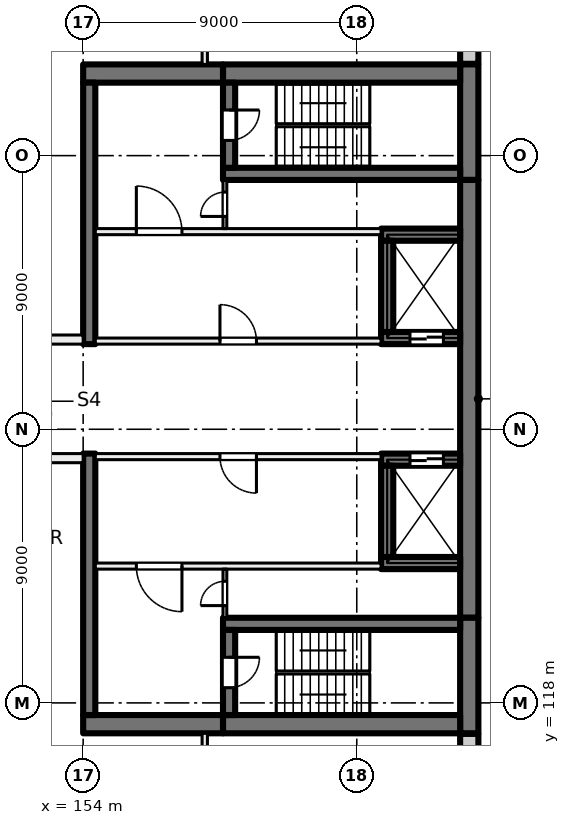
"""IFC4 building model, lengths in metres.
Left out: names, types, materials, properties, quantities, classifications, styles, units other than length and angle.
Written with IfcOpenShell. Run it as: python <this file> out.ifc"""

import sys

from ifc_helpers import new_model, si_unit, direction, frame, frame_2d, origin, place, context, subcontext, project, spatial, rectangle, extrude, element, fill, save


model = new_model("IFC4")
c1 = context("Model", 3, precision=1e-05, world=origin(), true_north=direction((0.0, 1.0)))
c2 = subcontext(c1, "Body", "Model", "MODEL_VIEW")
j1 = project(units=[si_unit("LENGTHUNIT", "METRE"), si_unit("PLANEANGLEUNIT", "RADIAN")], contexts=[c1])
p1 = place(None, origin())
s1 = spatial("IfcSite", under=j1, at=p1, CompositionType="ELEMENT")
p2 = place(p1, origin())
s2 = spatial("IfcBuilding", under=s1, at=p2, CompositionType="ELEMENT")
p3 = place(p2, frame((0.0, 0.0, 43.5)))
s3 = spatial("IfcBuildingStorey", under=s2, at=p3, CompositionType="ELEMENT", Elevation=43.5)
p4 = place(p3, frame((166.7, 139.0, 0.0), z_axis=(0.0, 0.0, 1.0), x_axis=(0.0, -1.0, 0.0)))
e1 = element("IfcWall", 1, at=p4, inside=s3, PredefinedType="SHEAR", context=c2, shape_type="SweptSolid", body=[
    extrude(rectangle(XDim=3.8, YDim=0.6, at=frame_2d((1.9, 0.0))), origin(), (0.0, 0.0, 1.0), 4.0),
])
p5 = place(p3, frame((166.7, 135.2, 0.0), z_axis=(0.0, 0.0, 1.0), x_axis=(0.0, -1.0, 0.0)))
e2 = element("IfcWall", 2, at=p5, inside=s3, PredefinedType="SHEAR", context=c2, shape_type="SweptSolid", body=[
    extrude(rectangle(XDim=14.4, YDim=0.6, at=frame_2d((7.2, 0.0))), origin(), (0.0, 0.0, 1.0), 4.0),
])
p6 = place(p3, frame((166.7, 120.8, 0.0), z_axis=(0.0, 0.0, 1.0), x_axis=(0.0, -1.0, 0.0)))
e3 = element("IfcWall", 3, at=p6, inside=s3, PredefinedType="SHEAR", context=c2, shape_type="SweptSolid", body=[
    extrude(rectangle(XDim=3.8, YDim=0.6, at=frame_2d((1.9, 0.0))), origin(), (0.0, 0.0, 1.0), 4.0),
])
for number, where, z_axis, x_axis in (
    (4, (166.4, 138.7, 0.0), (0.0, 0.0, 1.0), (-1.0, 0.0, 0.0)),
    (5, (166.4, 117.3, 0.0), (0.0, 0.0, 1.0), (-1.0, 0.0, 0.0)),
):
    element("IfcWall", number, at=place(p3, frame(where, z_axis=z_axis, x_axis=x_axis)), inside=s3, PredefinedType="SHEAR", context=c2, shape_type="SweptSolid", body=[
        extrude(rectangle(XDim=7.8, YDim=0.6, at=frame_2d((3.9, 0.0))), origin(), (0.0, 0.0, 1.0), 4.0),
    ])
for number, where, z_axis, x_axis in (
    (6, (158.6, 138.7, 0.0), (0.0, 0.0, 1.0), (-1.0, 0.0, 0.0)),
    (7, (158.6, 117.3, 0.0), (0.0, 0.0, 1.0), (-1.0, 0.0, 0.0)),
):
    element("IfcWall", number, at=place(p3, frame(where, z_axis=z_axis, x_axis=x_axis)), inside=s3, PredefinedType="SHEAR", context=c2, shape_type="SweptSolid", body=[
        extrude(rectangle(XDim=4.6, YDim=0.6, at=frame_2d((2.3, 0.0))), origin(), (0.0, 0.0, 1.0), 4.0),
    ])
p7 = place(p3, frame((166.4, 135.4, 0.0), z_axis=(0.0, 0.0, 1.0), x_axis=(-1.0, 0.0, 0.0)))
e8 = element("IfcWall", 8, at=p7, inside=s3, PredefinedType="SHEAR", context=c2, shape_type="SweptSolid", body=[
    extrude(rectangle(XDim=7.8, YDim=0.4, at=frame_2d((3.9, 0.0))), origin(), (0.0, 0.0, 1.0), 4.0),
])
p8 = place(p3, frame((158.8, 138.4, 0.0), z_axis=(0.0, 0.0, 1.0), x_axis=(0.0, -1.0, 0.0)))
e9 = element("IfcWall", 9, at=p8, inside=s3, PredefinedType="SHEAR", context=c2, shape_type="SweptSolid", body=[
    extrude(rectangle(XDim=2.8, YDim=0.4, at=frame_2d((1.4, 0.0))), origin(), (0.0, 0.0, 1.0), 4.0),
])
p9 = place(p8, frame((0.9, 0.0, 0.0)))
e10 = element("IfcOpeningElement", 10, at=p9, cuts=e9, PredefinedType="OPENING", context=c2, shape_type="SweptSolid", body=[
    extrude(rectangle(XDim=1.0, YDim=2.1, at=frame_2d((0.5, 1.05))), frame((0.0, 0.21, 0.0), z_axis=(0.0, -1.0, 0.0), x_axis=(1.0, 0.0, 0.0)), (0.0, 0.0, 1.0), 0.42),
])
p10 = place(p3, frame((166.4, 120.6, 0.0), z_axis=(0.0, 0.0, 1.0), x_axis=(-1.0, 0.0, 0.0)))
e11 = element("IfcWall", 11, at=p10, inside=s3, PredefinedType="SHEAR", context=c2, shape_type="SweptSolid", body=[
    extrude(rectangle(XDim=7.8, YDim=0.4, at=frame_2d((3.9, 0.0))), origin(), (0.0, 0.0, 1.0), 4.0),
])
p11 = place(p3, frame((158.8, 120.4, 0.0), z_axis=(0.0, 0.0, 1.0), x_axis=(0.0, -1.0, 0.0)))
e12 = element("IfcWall", 12, at=p11, inside=s3, PredefinedType="SHEAR", context=c2, shape_type="SweptSolid", body=[
    extrude(rectangle(XDim=2.8, YDim=0.4, at=frame_2d((1.4, 0.0))), origin(), (0.0, 0.0, 1.0), 4.0),
])
p12 = place(p11, frame((0.9, 0.0, 0.0)))
e13 = element("IfcOpeningElement", 13, at=p12, cuts=e12, PredefinedType="OPENING", context=c2, shape_type="SweptSolid", body=[
    extrude(rectangle(XDim=1.0, YDim=2.1, at=frame_2d((0.5, 1.05))), frame((0.0, 0.21, 0.0), z_axis=(0.0, -1.0, 0.0), x_axis=(1.0, 0.0, 0.0)), (0.0, 0.0, 1.0), 0.42),
])
p13 = place(p3, frame((166.4, 130.0, 0.0), z_axis=(0.0, 0.0, 1.0), x_axis=(-1.0, 0.0, 0.0)))
e14 = element("IfcWall", 14, at=p13, inside=s3, PredefinedType="SHEAR", context=c2, shape_type="SweptSolid", body=[
    extrude(rectangle(XDim=2.6, YDim=0.4, at=frame_2d((1.3, 0.0))), origin(), (0.0, 0.0, 1.0), 4.0),
])
p14 = place(p13, frame((0.55, 0.0, 0.0)))
e15 = element("IfcOpeningElement", 15, at=p14, cuts=e14, PredefinedType="OPENING", context=c2, shape_type="SweptSolid", body=[
    extrude(rectangle(XDim=1.1, YDim=2.1, at=frame_2d((0.55, 1.05))), frame((0.0, 0.21, 0.0), z_axis=(0.0, -1.0, 0.0), x_axis=(1.0, 0.0, 0.0)), (0.0, 0.0, 1.0), 0.42),
])
p15 = place(p3, frame((166.4, 133.4, 0.0), z_axis=(0.0, 0.0, 1.0), x_axis=(-1.0, 0.0, 0.0)))
e16 = element("IfcWall", 16, at=p15, inside=s3, PredefinedType="SHEAR", context=c2, shape_type="SweptSolid", body=[
    extrude(rectangle(XDim=2.6, YDim=0.4, at=frame_2d((1.3, 0.0))), origin(), (0.0, 0.0, 1.0), 4.0),
])
p16 = place(p3, frame((164.0, 133.2, 0.0), z_axis=(0.0, 0.0, 1.0), x_axis=(0.0, -1.0, 0.0)))
e17 = element("IfcWall", 17, at=p16, inside=s3, PredefinedType="SHEAR", context=c2, shape_type="SweptSolid", body=[
    extrude(rectangle(XDim=3.0, YDim=0.4, at=frame_2d((1.5, 0.0))), origin(), (0.0, 0.0, 1.0), 4.0),
])
p17 = place(p3, frame((166.4, 126.0, 0.0), z_axis=(0.0, 0.0, 1.0), x_axis=(-1.0, 0.0, 0.0)))
e18 = element("IfcWall", 18, at=p17, inside=s3, PredefinedType="SHEAR", context=c2, shape_type="SweptSolid", body=[
    extrude(rectangle(XDim=2.6, YDim=0.4, at=frame_2d((1.3, 0.0))), origin(), (0.0, 0.0, 1.0), 4.0),
])
p18 = place(p17, frame((0.55, 0.0, 0.0)))
e19 = element("IfcOpeningElement", 19, at=p18, cuts=e18, PredefinedType="OPENING", context=c2, shape_type="SweptSolid", body=[
    extrude(rectangle(XDim=1.1, YDim=2.1, at=frame_2d((0.55, 1.05))), frame((0.0, 0.21, 0.0), z_axis=(0.0, -1.0, 0.0), x_axis=(1.0, 0.0, 0.0)), (0.0, 0.0, 1.0), 0.42),
])
p19 = place(p3, frame((166.4, 122.6, 0.0), z_axis=(0.0, 0.0, 1.0), x_axis=(-1.0, 0.0, 0.0)))
e20 = element("IfcWall", 20, at=p19, inside=s3, PredefinedType="SHEAR", context=c2, shape_type="SweptSolid", body=[
    extrude(rectangle(XDim=2.6, YDim=0.4, at=frame_2d((1.3, 0.0))), origin(), (0.0, 0.0, 1.0), 4.0),
])
p20 = place(p3, frame((164.0, 125.8, 0.0), z_axis=(0.0, 0.0, 1.0), x_axis=(0.0, -1.0, 0.0)))
e21 = element("IfcWall", 21, at=p20, inside=s3, PredefinedType="SHEAR", context=c2, shape_type="SweptSolid", body=[
    extrude(rectangle(XDim=3.0, YDim=0.4, at=frame_2d((1.5, 0.0))), origin(), (0.0, 0.0, 1.0), 4.0),
])
for number, where, z_axis, x_axis in (
    (22, (154.2, 138.4, 0.0), (0.0, 0.0, 1.0), (0.0, -1.0, 0.0)),
    (23, (154.2, 126.2, 0.0), (0.0, 0.0, 1.0), (0.0, -1.0, 0.0)),
):
    element("IfcWall", number, at=place(p3, frame(where, z_axis=z_axis, x_axis=x_axis)), inside=s3, PredefinedType="SHEAR", context=c2, shape_type="SweptSolid", body=[
        extrude(rectangle(XDim=8.6, YDim=0.4, at=frame_2d((4.3, 0.0))), origin(), (0.0, 0.0, 1.0), 4.0),
    ])
p21 = place(p3, frame((166.7, 116.98, 0.0), z_axis=(0.0, 0.0, 1.0), x_axis=(0.0, -1.0, 0.0)))
e24 = element("IfcWall", 24, at=p21, inside=s3, PredefinedType="SOLIDWALL", context=c2, shape_type="SweptSolid", body=[
    extrude(rectangle(XDim=2.98, YDim=0.6, at=frame_2d((1.49, 0.0))), origin(), (0.0, 0.0, 1.0), 3.625),
])
p22 = place(p3, frame((166.7, 141.93, 0.0), z_axis=(0.0, 0.0, 1.0), x_axis=(0.0, -1.0, 0.0)))
e25 = element("IfcWall", 25, at=p22, inside=s3, PredefinedType="SOLIDWALL", context=c2, shape_type="SweptSolid", body=[
    extrude(rectangle(XDim=2.91, YDim=0.6, at=frame_2d((1.455, 0.0))), origin(), (0.0, 0.0, 1.0), 3.625),
])
p23 = place(p3, frame((163.8, 126.1, 0.0), z_axis=(0.0, 0.0, 1.0), x_axis=(-1.0, 0.0, 0.0)))
e26 = element("IfcWall", 26, at=p23, inside=s3, PredefinedType="PARTITIONING", context=c2, shape_type="SweptSolid", body=[
    extrude(rectangle(XDim=9.4, YDim=0.2, at=frame_2d((4.7, 0.0))), origin(), (0.0, 0.0, 1.0), 3.625),
])
p24 = place(p23, frame((4.1, 0.0, 0.0)))
e27 = element("IfcOpeningElement", 27, at=p24, cuts=e26, PredefinedType="OPENING", context=c2, shape_type="SweptSolid", body=[
    extrude(rectangle(XDim=1.2, YDim=2.1, at=frame_2d((0.6, 1.05))), frame((0.0, 0.11, 0.0), z_axis=(0.0, -1.0, 0.0), x_axis=(1.0, 0.0, 0.0)), (0.0, 0.0, 1.0), 0.22),
])
p25 = place(p3, frame((163.8, 122.5, 0.0), z_axis=(0.0, 0.0, 1.0), x_axis=(-1.0, 0.0, 0.0)))
e28 = element("IfcWall", 28, at=p25, inside=s3, PredefinedType="PARTITIONING", context=c2, shape_type="SweptSolid", body=[
    extrude(rectangle(XDim=9.4, YDim=0.2, at=frame_2d((4.7, 0.0))), origin(), (0.0, 0.0, 1.0), 3.625),
])
p26 = place(p25, frame((6.55, 0.0, 0.0)))
e29 = element("IfcOpeningElement", 29, at=p26, cuts=e28, PredefinedType="OPENING", context=c2, shape_type="SweptSolid", body=[
    extrude(rectangle(XDim=1.5, YDim=2.1, at=frame_2d((0.75, 1.05))), frame((0.0, 0.11, 0.0), z_axis=(0.0, -1.0, 0.0), x_axis=(1.0, 0.0, 0.0)), (0.0, 0.0, 1.0), 0.22),
])
p27 = place(p3, frame((158.663, 120.8, 0.0), z_axis=(0.0, 0.0, 1.0), x_axis=(0.0, 1.0, 0.0)))
e30 = element("IfcWall", 30, at=p27, inside=s3, PredefinedType="PARTITIONING", context=c2, shape_type="SweptSolid", body=[
    extrude(rectangle(XDim=1.6, YDim=0.125, at=frame_2d((0.8, 0.0))), origin(), (0.0, 0.0, 1.0), 3.625),
])
p28 = place(p27, frame((0.4, 0.0, 0.0)))
e31 = element("IfcOpeningElement", 31, at=p28, cuts=e30, PredefinedType="OPENING", context=c2, shape_type="SweptSolid", body=[
    extrude(rectangle(XDim=0.8, YDim=2.1, at=frame_2d((0.4, 1.05))), frame((0.0, 0.073, 0.0), z_axis=(0.0, -1.0, 0.0), x_axis=(1.0, 0.0, 0.0)), (0.0, 0.0, 1.0), 0.145),
])
p29 = place(p3, frame((154.4, 129.9, 0.0), z_axis=(0.0, 0.0, 1.0), x_axis=(1.0, 0.0, 0.0)))
e32 = element("IfcWall", 32, at=p29, inside=s3, PredefinedType="PARTITIONING", context=c2, shape_type="SweptSolid", body=[
    extrude(rectangle(XDim=9.4, YDim=0.2, at=frame_2d((4.7, 0.0))), origin(), (0.0, 0.0, 1.0), 3.625),
])
p30 = place(p29, frame((4.1, 0.0, 0.0)))
e33 = element("IfcOpeningElement", 33, at=p30, cuts=e32, PredefinedType="OPENING", context=c2, shape_type="SweptSolid", body=[
    extrude(rectangle(XDim=1.2, YDim=2.1, at=frame_2d((0.6, 1.05))), frame((0.0, 0.11, 0.0), z_axis=(0.0, -1.0, 0.0), x_axis=(1.0, 0.0, 0.0)), (0.0, 0.0, 1.0), 0.22),
])
p31 = place(p3, frame((154.4, 133.5, 0.0), z_axis=(0.0, 0.0, 1.0), x_axis=(1.0, 0.0, 0.0)))
e34 = element("IfcWall", 34, at=p31, inside=s3, PredefinedType="PARTITIONING", context=c2, shape_type="SweptSolid", body=[
    extrude(rectangle(XDim=9.4, YDim=0.2, at=frame_2d((4.7, 0.0))), origin(), (0.0, 0.0, 1.0), 3.625),
])
p32 = place(p31, frame((1.35, 0.0, 0.0)))
e35 = element("IfcOpeningElement", 35, at=p32, cuts=e34, PredefinedType="OPENING", context=c2, shape_type="SweptSolid", body=[
    extrude(rectangle(XDim=1.5, YDim=2.1, at=frame_2d((0.75, 1.05))), frame((0.0, 0.11, 0.0), z_axis=(0.0, -1.0, 0.0), x_axis=(1.0, 0.0, 0.0)), (0.0, 0.0, 1.0), 0.22),
])
p33 = place(p3, frame((158.663, 133.6, 0.0), z_axis=(0.0, 0.0, 1.0), x_axis=(0.0, 1.0, 0.0)))
e36 = element("IfcWall", 36, at=p33, inside=s3, PredefinedType="PARTITIONING", context=c2, shape_type="SweptSolid", body=[
    extrude(rectangle(XDim=1.6, YDim=0.125, at=frame_2d((0.8, 0.0))), origin(), (0.0, 0.0, 1.0), 3.625),
])
p34 = place(p33, frame((0.4, 0.0, 0.0)))
e37 = element("IfcOpeningElement", 37, at=p34, cuts=e36, PredefinedType="OPENING", context=c2, shape_type="SweptSolid", body=[
    extrude(rectangle(XDim=0.8, YDim=2.1, at=frame_2d((0.4, 1.05))), frame((0.0, 0.073, 0.0), z_axis=(0.0, -1.0, 0.0), x_axis=(1.0, 0.0, 0.0)), (0.0, 0.0, 1.0), 0.145),
])
p35 = place(p3, frame((140.0, 129.95, 0.0), z_axis=(0.0, 0.0, 1.0), x_axis=(1.0, 0.0, 0.0)))
e38 = element("IfcWall", 38, at=p35, inside=s3, PredefinedType="PARTITIONING", context=c2, shape_type="SweptSolid", body=[
    extrude(rectangle(XDim=14.0, YDim=0.3, at=frame_2d((7.0, 0.0))), origin(), (0.0, 0.0, 1.0), 3.625),
])
p36 = place(p35, frame((6.1, 0.0, 0.0)))
e39 = element("IfcOpeningElement", 39, at=p36, cuts=e38, PredefinedType="OPENING", context=c2, shape_type="SweptSolid", body=[
    extrude(rectangle(XDim=1.8, YDim=2.1, at=frame_2d((0.9, 1.05))), frame((0.0, 0.16, 0.0), z_axis=(0.0, -1.0, 0.0), x_axis=(1.0, 0.0, 0.0)), (0.0, 0.0, 1.0), 0.32),
])
p37 = place(p3, frame((154.0, 126.05, 0.0), z_axis=(0.0, 0.0, 1.0), x_axis=(-1.0, 0.0, 0.0)))
e40 = element("IfcWall", 40, at=p37, inside=s3, PredefinedType="PARTITIONING", context=c2, shape_type="SweptSolid", body=[
    extrude(rectangle(XDim=14.0, YDim=0.3, at=frame_2d((7.0, 0.0))), origin(), (0.0, 0.0, 1.0), 3.625),
])
p38 = place(p37, frame((10.25, 0.0, 0.0)))
e41 = element("IfcOpeningElement", 41, at=p38, cuts=e40, PredefinedType="OPENING", context=c2, shape_type="SweptSolid", body=[
    extrude(rectangle(XDim=1.0, YDim=2.1, at=frame_2d((0.5, 1.05))), frame((0.0, 0.16, 0.0), z_axis=(0.0, -1.0, 0.0), x_axis=(1.0, 0.0, 0.0)), (0.0, 0.0, 1.0), 0.32),
])
p39 = place(p37, frame((1.6, 0.0, 0.0)))
e42 = element("IfcOpeningElement", 42, at=p39, cuts=e40, PredefinedType="OPENING", context=c2, shape_type="SweptSolid", body=[
    extrude(rectangle(XDim=1.8, YDim=2.1, at=frame_2d((0.9, 1.05))), frame((0.0, 0.16, 0.0), z_axis=(0.0, -1.0, 0.0), x_axis=(1.0, 0.0, 0.0)), (0.0, 0.0, 1.0), 0.32),
])
p40 = place(p3, frame((158.0, 110.6, 0.0), z_axis=(0.0, 0.0, 1.0), x_axis=(0.0, 1.0, 0.0)))
e43 = element("IfcWall", 43, at=p40, inside=s3, PredefinedType="PARTITIONING", context=c2, shape_type="SweptSolid", body=[
    extrude(rectangle(XDim=6.4, YDim=0.175, at=frame_2d((3.2, 0.0))), origin(), (0.0, 0.0, 1.0), 3.625),
])
p41 = place(p40, frame((2.6, 0.0, 0.0)))
e44 = element("IfcOpeningElement", 44, at=p41, cuts=e43, PredefinedType="OPENING", context=c2, shape_type="SweptSolid", body=[
    extrude(rectangle(XDim=1.2, YDim=2.1, at=frame_2d((0.6, 1.05))), frame((0.0, 0.097, 0.0), z_axis=(0.0, -1.0, 0.0), x_axis=(1.0, 0.0, 0.0)), (0.0, 0.0, 1.0), 0.195),
])
p42 = place(p3, frame((158.0, 139.0, 0.0), z_axis=(0.0, 0.0, 1.0), x_axis=(0.0, 1.0, 0.0)))
e45 = element("IfcWall", 45, at=p42, inside=s3, PredefinedType="PARTITIONING", context=c2, shape_type="SweptSolid", body=[
    extrude(rectangle(XDim=6.4, YDim=0.175, at=frame_2d((3.2, 0.0))), origin(), (0.0, 0.0, 1.0), 3.625),
])
p43 = place(p42, frame((2.6, 0.0, 0.0)))
e46 = element("IfcOpeningElement", 46, at=p43, cuts=e45, PredefinedType="OPENING", context=c2, shape_type="SweptSolid", body=[
    extrude(rectangle(XDim=1.2, YDim=2.1, at=frame_2d((0.6, 1.05))), frame((0.0, 0.097, 0.0), z_axis=(0.0, -1.0, 0.0), x_axis=(1.0, 0.0, 0.0)), (0.0, 0.0, 1.0), 0.195),
])
p44 = place(p18, origin())
e47 = element("IfcDoor", 47, at=p44, inside=s3, OperationType="DOUBLE_DOOR_SLIDING", PredefinedType="DOOR", context=c2, shape_type="SweptSolid", body=[
    extrude(rectangle(XDim=1.1, YDim=2.1, at=frame_2d((0.55, 1.05))), frame((0.0, 0.025, 0.0), z_axis=(0.0, -1.0, 0.0), x_axis=(1.0, 0.0, 0.0)), (0.0, 0.0, 1.0), 0.05),
])
fill(e19, e47)
p45 = place(p14, origin())
e48 = element("IfcDoor", 48, at=p45, inside=s3, OperationType="DOUBLE_DOOR_SLIDING", PredefinedType="DOOR", context=c2, shape_type="SweptSolid", body=[
    extrude(rectangle(XDim=1.1, YDim=2.1, at=frame_2d((0.55, 1.05))), frame((0.0, 0.025, 0.0), z_axis=(0.0, -1.0, 0.0), x_axis=(1.0, 0.0, 0.0)), (0.0, 0.0, 1.0), 0.05),
])
fill(e15, e48)
p46 = place(p24, origin())
e49 = element("IfcDoor", 49, at=p46, inside=s3, OperationType="DOUBLE_DOOR_SINGLE_SWING", PredefinedType="DOOR", context=c2, shape_type="SweptSolid", body=[
    extrude(rectangle(XDim=1.2, YDim=2.1, at=frame_2d((0.6, 1.05))), frame((0.0, 0.025, 0.0), z_axis=(0.0, -1.0, 0.0), x_axis=(1.0, 0.0, 0.0)), (0.0, 0.0, 1.0), 0.05),
])
fill(e27, e49)
p47 = place(p26, origin())
e50 = element("IfcDoor", 50, at=p47, inside=s3, OperationType="DOUBLE_DOOR_SINGLE_SWING", PredefinedType="DOOR", context=c2, shape_type="SweptSolid", body=[
    extrude(rectangle(XDim=1.5, YDim=2.1, at=frame_2d((0.75, 1.05))), frame((0.0, 0.025, 0.0), z_axis=(0.0, -1.0, 0.0), x_axis=(1.0, 0.0, 0.0)), (0.0, 0.0, 1.0), 0.05),
])
fill(e29, e50)
p48 = place(p12, origin())
e51 = element("IfcDoor", 51, at=p48, inside=s3, OperationType="SINGLE_SWING_LEFT", PredefinedType="DOOR", context=c2, shape_type="SweptSolid", body=[
    extrude(rectangle(XDim=1.0, YDim=2.1, at=frame_2d((0.5, 1.05))), frame((0.0, 0.025, 0.0), z_axis=(0.0, -1.0, 0.0), x_axis=(1.0, 0.0, 0.0)), (0.0, 0.0, 1.0), 0.05),
])
fill(e13, e51)
p49 = place(p28, origin())
e52 = element("IfcDoor", 52, at=p49, inside=s3, OperationType="SINGLE_SWING_RIGHT", PredefinedType="DOOR", context=c2, shape_type="SweptSolid", body=[
    extrude(rectangle(XDim=0.8, YDim=2.1, at=frame_2d((0.4, 1.05))), frame((0.0, 0.025, 0.0), z_axis=(0.0, -1.0, 0.0), x_axis=(1.0, 0.0, 0.0)), (0.0, 0.0, 1.0), 0.05),
])
fill(e31, e52)
p50 = place(p30, origin())
e53 = element("IfcDoor", 53, at=p50, inside=s3, OperationType="DOUBLE_DOOR_SINGLE_SWING", PredefinedType="DOOR", context=c2, shape_type="SweptSolid", body=[
    extrude(rectangle(XDim=1.2, YDim=2.1, at=frame_2d((0.6, 1.05))), frame((0.0, 0.025, 0.0), z_axis=(0.0, -1.0, 0.0), x_axis=(1.0, 0.0, 0.0)), (0.0, 0.0, 1.0), 0.05),
])
fill(e33, e53)
p51 = place(p32, origin())
e54 = element("IfcDoor", 54, at=p51, inside=s3, OperationType="DOUBLE_DOOR_SINGLE_SWING", PredefinedType="DOOR", context=c2, shape_type="SweptSolid", body=[
    extrude(rectangle(XDim=1.5, YDim=2.1, at=frame_2d((0.75, 1.05))), frame((0.0, 0.025, 0.0), z_axis=(0.0, -1.0, 0.0), x_axis=(1.0, 0.0, 0.0)), (0.0, 0.0, 1.0), 0.05),
])
fill(e35, e54)
p52 = place(p9, origin())
e55 = element("IfcDoor", 55, at=p52, inside=s3, OperationType="SINGLE_SWING_RIGHT", PredefinedType="DOOR", context=c2, shape_type="SweptSolid", body=[
    extrude(rectangle(XDim=1.0, YDim=2.1, at=frame_2d((0.5, 1.05))), frame((0.0, 0.025, 0.0), z_axis=(0.0, -1.0, 0.0), x_axis=(1.0, 0.0, 0.0)), (0.0, 0.0, 1.0), 0.05),
])
fill(e10, e55)
p53 = place(p34, origin())
e56 = element("IfcDoor", 56, at=p53, inside=s3, OperationType="SINGLE_SWING_LEFT", PredefinedType="DOOR", context=c2, shape_type="SweptSolid", body=[
    extrude(rectangle(XDim=0.8, YDim=2.1, at=frame_2d((0.4, 1.05))), frame((0.0, 0.025, 0.0), z_axis=(0.0, -1.0, 0.0), x_axis=(1.0, 0.0, 0.0)), (0.0, 0.0, 1.0), 0.05),
])
fill(e37, e56)
save(model, sys.argv[1])
